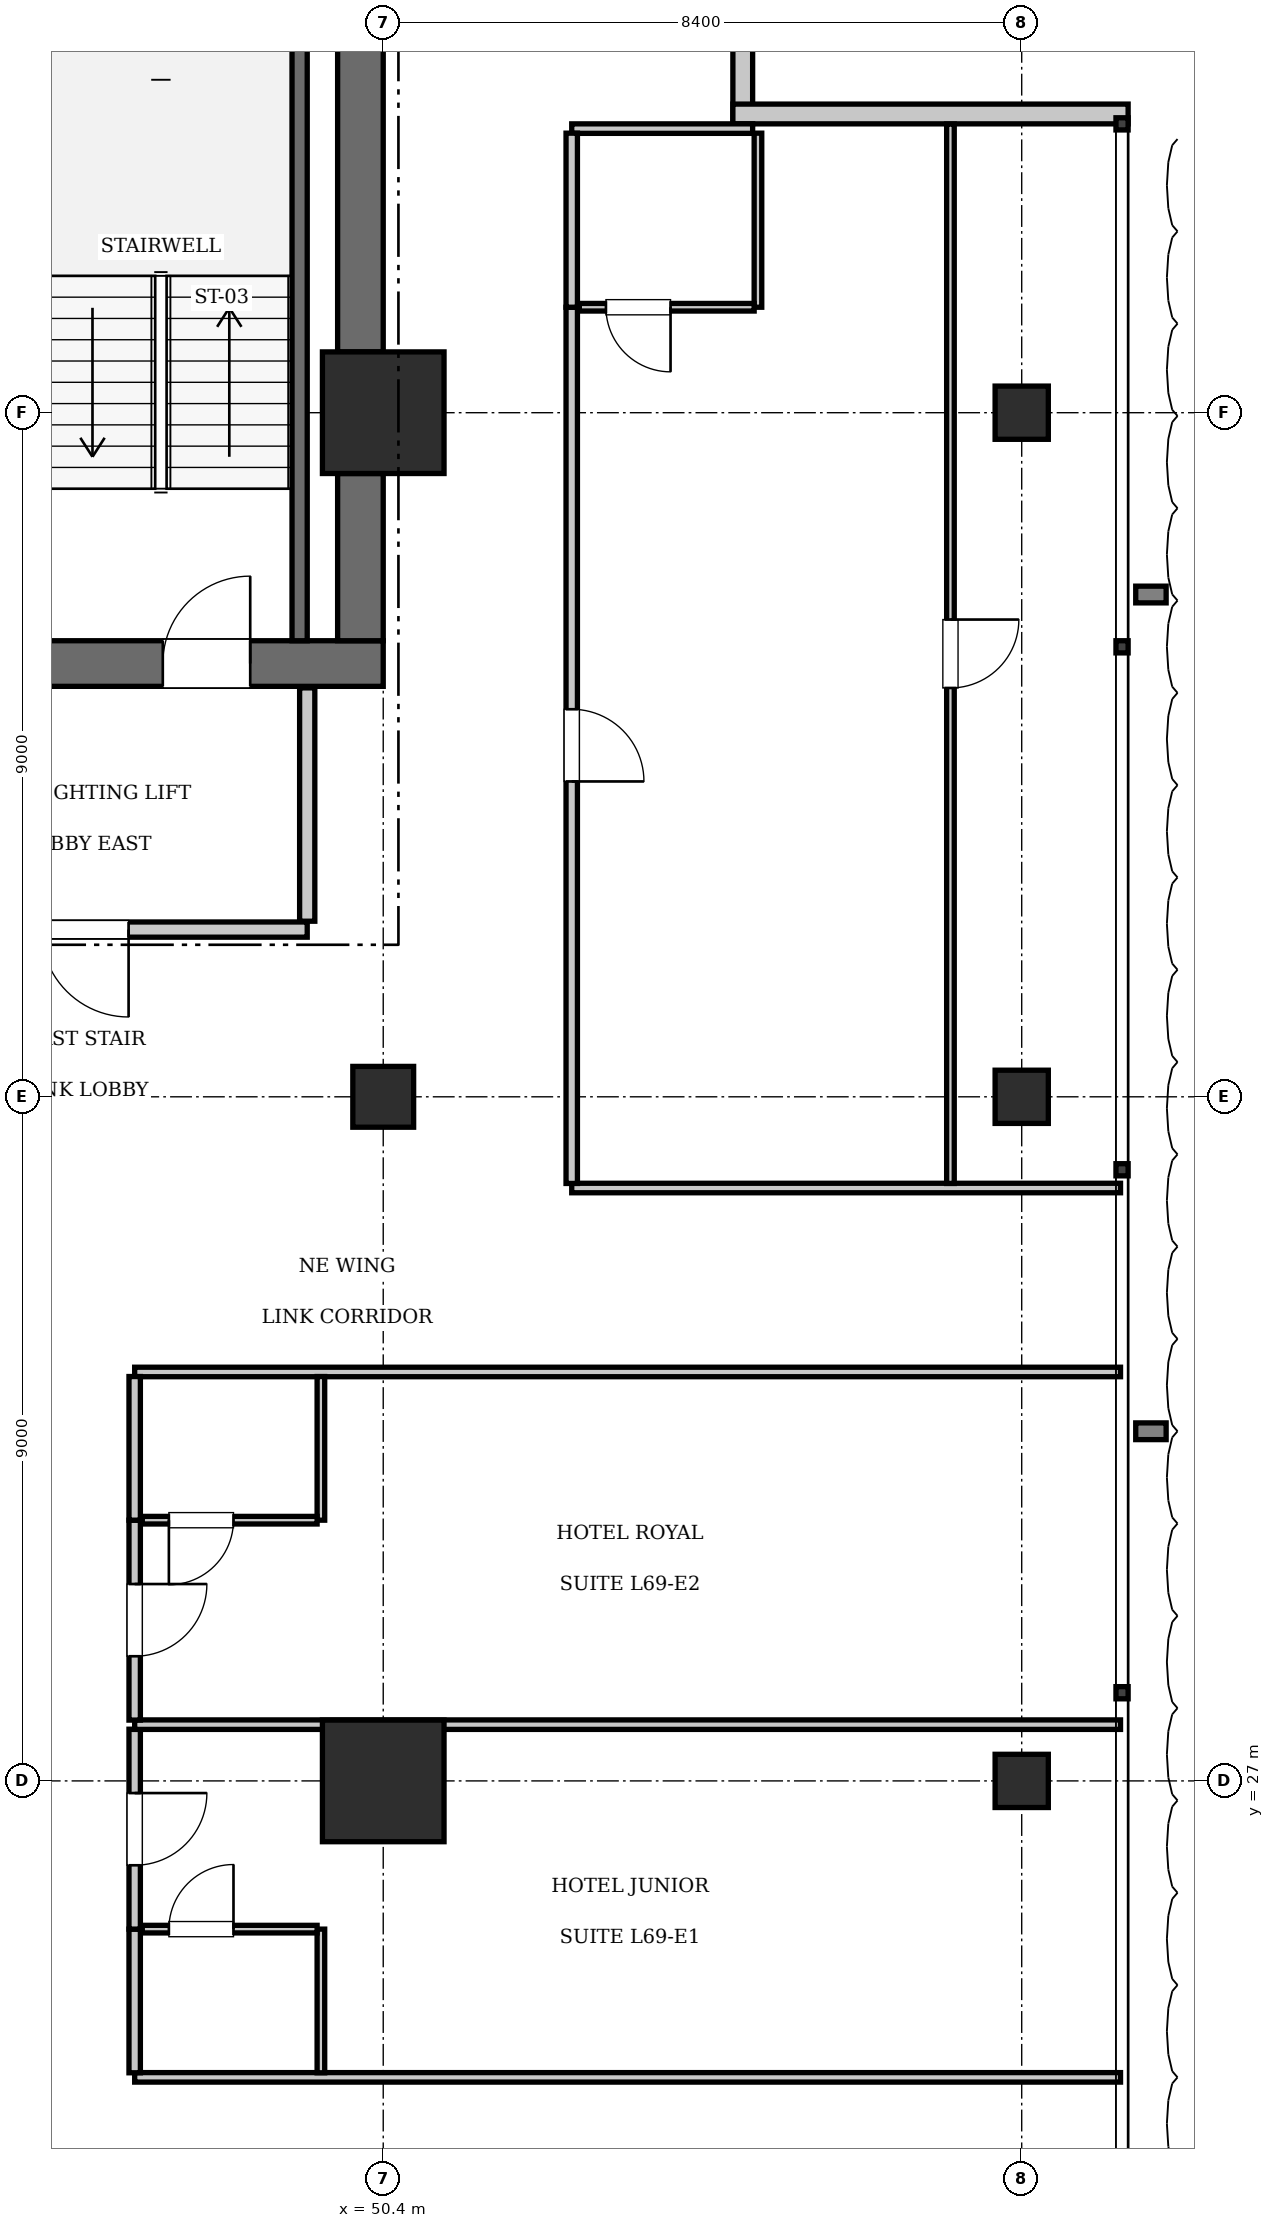
"""IFC4 building model, lengths in metres.
Left out: names, types, materials, properties, quantities, classifications, styles, units other than length and angle.
Written with IfcOpenShell. Run it as: python <this file> out.ifc"""

import sys

from ifc_helpers import new_model, si_unit, direction, frame, frame_2d, origin, origin_2d, place, context, subcontext, project, spatial, rectangle, extrude, element, fill, save


model = new_model("IFC4")
c1 = context("Model", 3, precision=1e-05, world=origin(), true_north=direction((0.0, 1.0)))
c2 = subcontext(c1, "Body", "Model", "MODEL_VIEW")
j1 = project(units=[si_unit("LENGTHUNIT", "METRE"), si_unit("PLANEANGLEUNIT", "RADIAN")], contexts=[c1])
p1 = place(None, origin())
s1 = spatial("IfcSite", under=j1, at=p1, CompositionType="ELEMENT")
p2 = place(p1, origin())
s2 = spatial("IfcBuilding", under=s1, at=p2, CompositionType="ELEMENT")
p3 = place(p2, frame((0.0, 0.0, 281.75)))
s3 = spatial("IfcBuildingStorey", under=s2, at=p3, CompositionType="ELEMENT", Elevation=281.75)
for number, where, z_axis, x_axis in (
    (1, (50.4, 27.0, 0.0), (0.0, 0.0, 1.0), (1.0, 0.0, 0.0)),
    (2, (50.4, 45.0, 0.0), (0.0, 0.0, 1.0), (1.0, 0.0, 0.0)),
):
    element("IfcColumn", number, at=place(p3, frame(where, z_axis=z_axis, x_axis=x_axis)), inside=s3, PredefinedType="COLUMN", context=c2, shape_type="SweptSolid", body=[
        extrude(rectangle(XDim=1.6, YDim=1.6, at=origin_2d()), origin(), (0.0, 0.0, 1.0), 3.85),
    ])
p4 = place(p3, frame((43.6, 41.7, 0.0), z_axis=(0.0, 0.0, 1.0), x_axis=(1.0, 0.0, 0.0)))
e3 = element("IfcWall", 3, at=p4, inside=s3, PredefinedType="SHEAR", context=c2, shape_type="SweptSolid", body=[
    extrude(rectangle(XDim=6.8, YDim=0.6, at=frame_2d((3.4, 0.0))), origin(), (0.0, 0.0, 1.0), 3.85),
])
p5 = place(p4, frame((3.9, 0.0, 0.0)))
e4 = element("IfcOpeningElement", 4, at=p5, cuts=e3, PredefinedType="OPENING", context=c2, shape_type="SweptSolid", body=[
    extrude(rectangle(XDim=1.15, YDim=2.15, at=frame_2d((0.575, 1.075))), frame((0.0, 0.31, 0.0), z_axis=(0.0, -1.0, 0.0), x_axis=(1.0, 0.0, 0.0)), (0.0, 0.0, 1.0), 0.62),
])
p6 = place(p4, frame((0.55, 0.0, 0.0)))
e5 = element("IfcOpeningElement", 5, at=p6, cuts=e3, PredefinedType="OPENING", context=c2, shape_type="SweptSolid", body=[
    extrude(rectangle(XDim=1.1, YDim=2.2, at=frame_2d((0.55, 1.1))), frame((0.0, 0.31, 0.0), z_axis=(0.0, -1.0, 0.0), x_axis=(1.0, 0.0, 0.0)), (0.0, 0.0, 1.0), 0.62),
])
p7 = place(p3, frame((50.1, 42.0, 0.0), z_axis=(0.0, 0.0, 1.0), x_axis=(0.0, 1.0, 0.0)))
e6 = element("IfcWall", 6, at=p7, inside=s3, PredefinedType="SHEAR", context=c2, shape_type="SweptSolid", body=[
    extrude(rectangle(XDim=2.2, YDim=0.6, at=frame_2d((1.1, 0.0))), origin(), (0.0, 0.0, 1.0), 3.85),
])
p8 = place(p3, frame((50.1, 45.8, 0.0), z_axis=(0.0, 0.0, 1.0), x_axis=(0.0, 1.0, 0.0)))
e7 = element("IfcWall", 7, at=p8, inside=s3, PredefinedType="SHEAR", context=c2, shape_type="SweptSolid", body=[
    extrude(rectangle(XDim=7.6, YDim=0.6, at=frame_2d((3.8, 0.0))), origin(), (0.0, 0.0, 1.0), 3.85),
])
p9 = place(p3, frame((50.4, 36.0, 0.0), z_axis=(0.0, 0.0, 1.0), x_axis=(1.0, 0.0, 0.0)))
e8 = element("IfcColumn", 8, at=p9, inside=s3, PredefinedType="COLUMN", context=c2, shape_type="SweptSolid", body=[
    extrude(rectangle(XDim=0.8, YDim=0.8, at=origin_2d()), origin(), (0.0, 0.0, 1.0), 3.85),
])
for number, where, z_axis, x_axis in (
    (9, (58.8, 27.0, 0.0), (0.0, 0.0, 1.0), (1.0, 0.0, 0.0)),
    (10, (58.8, 36.0, 0.0), (0.0, 0.0, 1.0), (1.0, 0.0, 0.0)),
    (11, (58.8, 45.0, 0.0), (0.0, 0.0, 1.0), (1.0, 0.0, 0.0)),
):
    element("IfcColumn", number, at=place(p3, frame(where, z_axis=z_axis, x_axis=x_axis)), inside=s3, PredefinedType="COLUMN", context=c2, shape_type="SweptSolid", body=[
        extrude(rectangle(XDim=0.7, YDim=0.7, at=origin_2d()), origin(), (0.0, 0.0, 1.0), 3.85),
    ])
p10 = place(p3, frame((49.3, 42.0, 0.0), z_axis=(0.0, 0.0, 1.0), x_axis=(0.0, 1.0, 0.0)))
e12 = element("IfcWall", 12, at=p10, inside=s3, PredefinedType="SOLIDWALL", context=c2, shape_type="SweptSolid", body=[
    extrude(rectangle(XDim=9.12, YDim=0.2, at=frame_2d((4.56, 0.0))), origin(), (0.0, 0.0, 1.0), 3.61),
])
for number, where, z_axis, x_axis in (
    (13, (55.13, 54.0, 0.0), (0.0, 0.0, 1.0), (0.0, -1.0, 0.0)),
    (14, (55.0, 48.93, 0.0), (0.0, 0.0, 1.0), (1.0, 0.0, 0.0)),
):
    element("IfcWall", number, at=place(p3, frame(where, z_axis=z_axis, x_axis=x_axis)), inside=s3, PredefinedType="SOLIDWALL", context=c2, shape_type="SweptSolid", body=[
        extrude(rectangle(XDim=5.2, YDim=0.26, at=frame_2d((2.6, 0.0))), origin(), (0.0, 0.0, 1.0), 3.61),
    ])
p11 = place(p3, frame((43.6, 38.2, 0.0), z_axis=(0.0, 0.0, 1.0), x_axis=(1.0, 0.0, 0.0)))
e15 = element("IfcWall", 15, at=p11, inside=s3, PredefinedType="PARTITIONING", context=c2, shape_type="SweptSolid", body=[
    extrude(rectangle(XDim=5.8, YDim=0.2, at=frame_2d((2.9, 0.0))), origin(), (0.0, 0.0, 1.0), 3.61),
])
p12 = place(p11, frame((2.3, 0.0, 0.0)))
e16 = element("IfcOpeningElement", 16, at=p12, cuts=e15, PredefinedType="OPENING", context=c2, shape_type="SweptSolid", body=[
    extrude(rectangle(XDim=1.15, YDim=2.15, at=frame_2d((0.575, 1.075))), frame((0.0, 0.11, 0.0), z_axis=(0.0, -1.0, 0.0), x_axis=(1.0, 0.0, 0.0)), (0.0, 0.0, 1.0), 0.22),
])
p13 = place(p3, frame((49.4, 38.31, 0.0), z_axis=(0.0, 0.0, 1.0), x_axis=(0.0, 1.0, 0.0)))
e17 = element("IfcWall", 17, at=p13, inside=s3, PredefinedType="PARTITIONING", context=c2, shape_type="SweptSolid", body=[
    extrude(rectangle(XDim=3.07, YDim=0.2, at=frame_2d((1.535, 0.0))), origin(), (0.0, 0.0, 1.0), 3.61),
])
for number, where, z_axis, x_axis in (
    (18, (47.13, 23.1, 0.0), (0.0, 0.0, 1.0), (1.0, 0.0, 0.0)),
    (19, (47.13, 32.38, 0.0), (0.0, 0.0, 1.0), (1.0, 0.0, 0.0)),
):
    element("IfcWall", number, at=place(p3, frame(where, z_axis=z_axis, x_axis=x_axis)), inside=s3, PredefinedType="PARTITIONING", context=c2, shape_type="SweptSolid", body=[
        extrude(rectangle(XDim=12.97, YDim=0.125, at=frame_2d((6.485, 0.0))), origin(), (0.0, 0.0, 1.0), 3.61),
    ])
p14 = place(p3, frame((47.13, 23.16, 0.0), z_axis=(0.0, 0.0, 1.0), x_axis=(0.0, 1.0, 0.0)))
e20 = element("IfcWall", 20, at=p14, inside=s3, PredefinedType="PARTITIONING", context=c2, shape_type="SweptSolid", body=[
    extrude(rectangle(XDim=1.89, YDim=0.15, at=frame_2d((0.945, 0.0))), origin(), (0.0, 0.0, 1.0), 3.61),
])
p15 = place(p3, frame((47.13, 25.05, 0.0), z_axis=(0.0, 0.0, 1.0), x_axis=(0.0, 1.0, 0.0)))
e21 = element("IfcWall", 21, at=p15, inside=s3, PredefinedType="PARTITIONING", context=c2, shape_type="SweptSolid", body=[
    extrude(rectangle(XDim=2.63, YDim=0.15, at=frame_2d((1.315, 0.0))), origin(), (0.0, 0.0, 1.0), 3.61),
])
p16 = place(p15, frame((0.84, 0.0, 0.0)))
e22 = element("IfcOpeningElement", 22, at=p16, cuts=e21, PredefinedType="OPENING", context=c2, shape_type="SweptSolid", body=[
    extrude(rectangle(XDim=0.95, YDim=2.15, at=frame_2d((0.475, 1.075))), frame((0.0, 0.085, 0.0), z_axis=(0.0, -1.0, 0.0), x_axis=(1.0, 0.0, 0.0)), (0.0, 0.0, 1.0), 0.17),
])
p17 = place(p3, frame((49.58, 23.16, 0.0), z_axis=(0.0, 0.0, 1.0), x_axis=(0.0, 1.0, 0.0)))
e23 = element("IfcWall", 23, at=p17, inside=s3, PredefinedType="PARTITIONING", context=c2, shape_type="SweptSolid", body=[
    extrude(rectangle(XDim=1.89, YDim=0.1, at=frame_2d((0.945, 0.0))), origin(), (0.0, 0.0, 1.0), 3.61),
])
p18 = place(p3, frame((47.23, 25.05, 0.0), z_axis=(0.0, 0.0, 1.0), x_axis=(1.0, 0.0, 0.0)))
e24 = element("IfcWall", 24, at=p18, inside=s3, PredefinedType="PARTITIONING", context=c2, shape_type="SweptSolid", body=[
    extrude(rectangle(XDim=2.3, YDim=0.1, at=frame_2d((1.15, 0.0))), origin(), (0.0, 0.0, 1.0), 3.61),
])
p19 = place(p18, frame((0.35, 0.0, 0.0)))
e25 = element("IfcOpeningElement", 25, at=p19, cuts=e24, PredefinedType="OPENING", context=c2, shape_type="SweptSolid", body=[
    extrude(rectangle(XDim=0.85, YDim=2.1, at=frame_2d((0.425, 1.05))), frame((0.0, 0.06, 0.0), z_axis=(0.0, -1.0, 0.0), x_axis=(1.0, 0.0, 0.0)), (0.0, 0.0, 1.0), 0.12),
])
p20 = place(p3, frame((47.13, 27.74, 0.0), z_axis=(0.0, 0.0, 1.0), x_axis=(1.0, 0.0, 0.0)))
e26 = element("IfcWall", 26, at=p20, inside=s3, PredefinedType="PARTITIONING", context=c2, shape_type="SweptSolid", body=[
    extrude(rectangle(XDim=12.97, YDim=0.125, at=frame_2d((6.485, 0.0))), origin(), (0.0, 0.0, 1.0), 3.61),
])
p21 = place(p3, frame((47.13, 27.8, 0.0), z_axis=(0.0, 0.0, 1.0), x_axis=(0.0, 1.0, 0.0)))
e27 = element("IfcWall", 27, at=p21, inside=s3, PredefinedType="PARTITIONING", context=c2, shape_type="SweptSolid", body=[
    extrude(rectangle(XDim=2.63, YDim=0.15, at=frame_2d((1.315, 0.0))), origin(), (0.0, 0.0, 1.0), 3.61),
])
p22 = place(p21, frame((0.84, 0.0, 0.0)))
e28 = element("IfcOpeningElement", 28, at=p22, cuts=e27, PredefinedType="OPENING", context=c2, shape_type="SweptSolid", body=[
    extrude(rectangle(XDim=0.95, YDim=2.15, at=frame_2d((0.475, 1.075))), frame((0.0, 0.085, 0.0), z_axis=(0.0, -1.0, 0.0), x_axis=(1.0, 0.0, 0.0)), (0.0, 0.0, 1.0), 0.17),
])
p23 = place(p3, frame((47.13, 30.43, 0.0), z_axis=(0.0, 0.0, 1.0), x_axis=(0.0, 1.0, 0.0)))
e29 = element("IfcWall", 29, at=p23, inside=s3, PredefinedType="PARTITIONING", context=c2, shape_type="SweptSolid", body=[
    extrude(rectangle(XDim=1.89, YDim=0.15, at=frame_2d((0.945, 0.0))), origin(), (0.0, 0.0, 1.0), 3.61),
])
p24 = place(p3, frame((49.58, 30.43, 0.0), z_axis=(0.0, 0.0, 1.0), x_axis=(0.0, 1.0, 0.0)))
e30 = element("IfcWall", 30, at=p24, inside=s3, PredefinedType="PARTITIONING", context=c2, shape_type="SweptSolid", body=[
    extrude(rectangle(XDim=1.89, YDim=0.1, at=frame_2d((0.945, 0.0))), origin(), (0.0, 0.0, 1.0), 3.61),
])
p25 = place(p3, frame((47.23, 30.43, 0.0), z_axis=(0.0, 0.0, 1.0), x_axis=(1.0, 0.0, 0.0)))
e31 = element("IfcWall", 31, at=p25, inside=s3, PredefinedType="PARTITIONING", context=c2, shape_type="SweptSolid", body=[
    extrude(rectangle(XDim=2.3, YDim=0.1, at=frame_2d((1.15, 0.0))), origin(), (0.0, 0.0, 1.0), 3.61),
])
p26 = place(p25, frame((0.35, 0.0, 0.0)))
e32 = element("IfcOpeningElement", 32, at=p26, cuts=e31, PredefinedType="OPENING", context=c2, shape_type="SweptSolid", body=[
    extrude(rectangle(XDim=0.85, YDim=2.1, at=frame_2d((0.425, 1.05))), frame((0.0, 0.06, 0.0), z_axis=(0.0, -1.0, 0.0), x_axis=(1.0, 0.0, 0.0)), (0.0, 0.0, 1.0), 0.12),
])
p27 = place(p3, frame((52.88, 34.8, 0.0), z_axis=(0.0, 0.0, 1.0), x_axis=(1.0, 0.0, 0.0)))
e33 = element("IfcWall", 33, at=p27, inside=s3, PredefinedType="PARTITIONING", context=c2, shape_type="SweptSolid", body=[
    extrude(rectangle(XDim=7.22, YDim=0.125, at=frame_2d((3.61, 0.0))), origin(), (0.0, 0.0, 1.0), 3.61),
])
p28 = place(p3, frame((52.88, 48.738, 0.0), z_axis=(0.0, 0.0, 1.0), x_axis=(1.0, 0.0, 0.0)))
e34 = element("IfcWall", 34, at=p28, inside=s3, PredefinedType="PARTITIONING", context=c2, shape_type="SweptSolid", body=[
    extrude(rectangle(XDim=2.38, YDim=0.125, at=frame_2d((1.19, 0.0))), origin(), (0.0, 0.0, 1.0), 3.61),
])
p29 = place(p3, frame((52.88, 34.86, 0.0), z_axis=(0.0, 0.0, 1.0), x_axis=(0.0, 1.0, 0.0)))
e35 = element("IfcWall", 35, at=p29, inside=s3, PredefinedType="PARTITIONING", context=c2, shape_type="SweptSolid", body=[
    extrude(rectangle(XDim=11.527, YDim=0.15, at=frame_2d((5.764, 0.0))), origin(), (0.0, 0.0, 1.0), 3.61),
])
p30 = place(p29, frame((5.289, 0.0, 0.0)))
e36 = element("IfcOpeningElement", 36, at=p30, cuts=e35, PredefinedType="OPENING", context=c2, shape_type="SweptSolid", body=[
    extrude(rectangle(XDim=0.95, YDim=2.15, at=frame_2d((0.475, 1.075))), frame((0.0, 0.085, 0.0), z_axis=(0.0, -1.0, 0.0), x_axis=(1.0, 0.0, 0.0)), (0.0, 0.0, 1.0), 0.17),
])
p31 = place(p3, frame((52.88, 46.387, 0.0), z_axis=(0.0, 0.0, 1.0), x_axis=(0.0, 1.0, 0.0)))
e37 = element("IfcWall", 37, at=p31, inside=s3, PredefinedType="PARTITIONING", context=c2, shape_type="SweptSolid", body=[
    extrude(rectangle(XDim=2.29, YDim=0.15, at=frame_2d((1.145, 0.0))), origin(), (0.0, 0.0, 1.0), 3.61),
])
p32 = place(p3, frame((55.33, 46.387, 0.0), z_axis=(0.0, 0.0, 1.0), x_axis=(0.0, 1.0, 0.0)))
e38 = element("IfcWall", 38, at=p32, inside=s3, PredefinedType="PARTITIONING", context=c2, shape_type="SweptSolid", body=[
    extrude(rectangle(XDim=2.29, YDim=0.1, at=frame_2d((1.145, 0.0))), origin(), (0.0, 0.0, 1.0), 3.61),
])
p33 = place(p3, frame((52.98, 46.387, 0.0), z_axis=(0.0, 0.0, 1.0), x_axis=(1.0, 0.0, 0.0)))
e39 = element("IfcWall", 39, at=p33, inside=s3, PredefinedType="PARTITIONING", context=c2, shape_type="SweptSolid", body=[
    extrude(rectangle(XDim=2.3, YDim=0.1, at=frame_2d((1.15, 0.0))), origin(), (0.0, 0.0, 1.0), 3.61),
])
p34 = place(p33, frame((0.35, 0.0, 0.0)))
e40 = element("IfcOpeningElement", 40, at=p34, cuts=e39, PredefinedType="OPENING", context=c2, shape_type="SweptSolid", body=[
    extrude(rectangle(XDim=0.85, YDim=2.1, at=frame_2d((0.425, 1.05))), frame((0.0, 0.06, 0.0), z_axis=(0.0, -1.0, 0.0), x_axis=(1.0, 0.0, 0.0)), (0.0, 0.0, 1.0), 0.12),
])
p35 = place(p3, frame((57.862, 34.86, 0.0), z_axis=(0.0, 0.0, 1.0), x_axis=(0.0, 1.0, 0.0)))
e41 = element("IfcWall", 41, at=p35, inside=s3, PredefinedType="PARTITIONING", context=c2, shape_type="SweptSolid", body=[
    extrude(rectangle(XDim=13.938, YDim=0.1, at=frame_2d((6.969, 0.0))), origin(), (0.0, 0.0, 1.0), 3.61),
])
p36 = place(p35, frame((6.519, 0.0, 0.0)))
e42 = element("IfcOpeningElement", 42, at=p36, cuts=e41, PredefinedType="OPENING", context=c2, shape_type="SweptSolid", body=[
    extrude(rectangle(XDim=0.9, YDim=2.1, at=frame_2d((0.45, 1.05))), frame((0.0, 0.06, 0.0), z_axis=(0.0, -1.0, 0.0), x_axis=(1.0, 0.0, 0.0)), (0.0, 0.0, 1.0), 0.12),
])
p37 = place(p5, origin())
e43 = element("IfcDoor", 43, at=p37, inside=s3, OperationType="SINGLE_SWING_RIGHT", PredefinedType="DOOR", context=c2, shape_type="SweptSolid", body=[
    extrude(rectangle(XDim=1.15, YDim=2.15, at=frame_2d((0.575, 1.075))), frame((0.0, 0.025, 0.0), z_axis=(0.0, -1.0, 0.0), x_axis=(1.0, 0.0, 0.0)), (0.0, 0.0, 1.0), 0.05),
])
fill(e4, e43)
p38 = place(p12, frame((1.15, 0.0, 0.0), z_axis=(0.0, 0.0, 1.0), x_axis=(-1.0, 0.0, 0.0)))
e44 = element("IfcDoor", 44, at=p38, inside=s3, OperationType="SINGLE_SWING_LEFT", PredefinedType="DOOR", context=c2, shape_type="SweptSolid", body=[
    extrude(rectangle(XDim=1.15, YDim=2.15, at=frame_2d((0.575, 1.075))), frame((0.0, 0.025, 0.0), z_axis=(0.0, -1.0, 0.0), x_axis=(1.0, 0.0, 0.0)), (0.0, 0.0, 1.0), 0.05),
])
fill(e16, e44)
p39 = place(p19, origin())
e45 = element("IfcDoor", 45, at=p39, inside=s3, OperationType="SINGLE_SWING_RIGHT", PredefinedType="DOOR", context=c2, shape_type="SweptSolid", body=[
    extrude(rectangle(XDim=0.85, YDim=2.1, at=frame_2d((0.425, 1.05))), frame((0.0, 0.025, 0.0), z_axis=(0.0, -1.0, 0.0), x_axis=(1.0, 0.0, 0.0)), (0.0, 0.0, 1.0), 0.05),
])
fill(e25, e45)
p40 = place(p16, frame((0.95, 0.0, 0.0), z_axis=(0.0, 0.0, 1.0), x_axis=(-1.0, 0.0, 0.0)))
e46 = element("IfcDoor", 46, at=p40, inside=s3, OperationType="SINGLE_SWING_LEFT", PredefinedType="DOOR", context=c2, shape_type="SweptSolid", body=[
    extrude(rectangle(XDim=0.95, YDim=2.15, at=frame_2d((0.475, 1.075))), frame((0.0, 0.025, 0.0), z_axis=(0.0, -1.0, 0.0), x_axis=(1.0, 0.0, 0.0)), (0.0, 0.0, 1.0), 0.05),
])
fill(e22, e46)
p41 = place(p26, frame((0.85, 0.0, 0.0), z_axis=(0.0, 0.0, 1.0), x_axis=(-1.0, 0.0, 0.0)))
e47 = element("IfcDoor", 47, at=p41, inside=s3, OperationType="SINGLE_SWING_RIGHT", PredefinedType="DOOR", context=c2, shape_type="SweptSolid", body=[
    extrude(rectangle(XDim=0.85, YDim=2.1, at=frame_2d((0.425, 1.05))), frame((0.0, 0.025, 0.0), z_axis=(0.0, -1.0, 0.0), x_axis=(1.0, 0.0, 0.0)), (0.0, 0.0, 1.0), 0.05),
])
fill(e32, e47)
p42 = place(p22, frame((0.95, 0.0, 0.0), z_axis=(0.0, 0.0, 1.0), x_axis=(-1.0, 0.0, 0.0)))
e48 = element("IfcDoor", 48, at=p42, inside=s3, OperationType="SINGLE_SWING_LEFT", PredefinedType="DOOR", context=c2, shape_type="SweptSolid", body=[
    extrude(rectangle(XDim=0.95, YDim=2.15, at=frame_2d((0.475, 1.075))), frame((0.0, 0.025, 0.0), z_axis=(0.0, -1.0, 0.0), x_axis=(1.0, 0.0, 0.0)), (0.0, 0.0, 1.0), 0.05),
])
fill(e28, e48)
p43 = place(p34, frame((0.85, 0.0, 0.0), z_axis=(0.0, 0.0, 1.0), x_axis=(-1.0, 0.0, 0.0)))
e49 = element("IfcDoor", 49, at=p43, inside=s3, OperationType="SINGLE_SWING_LEFT", PredefinedType="DOOR", context=c2, shape_type="SweptSolid", body=[
    extrude(rectangle(XDim=0.85, YDim=2.1, at=frame_2d((0.425, 1.05))), frame((0.0, 0.025, 0.0), z_axis=(0.0, -1.0, 0.0), x_axis=(1.0, 0.0, 0.0)), (0.0, 0.0, 1.0), 0.05),
])
fill(e40, e49)
p44 = place(p30, frame((0.95, 0.0, 0.0), z_axis=(0.0, 0.0, 1.0), x_axis=(-1.0, 0.0, 0.0)))
e50 = element("IfcDoor", 50, at=p44, inside=s3, OperationType="SINGLE_SWING_RIGHT", PredefinedType="DOOR", context=c2, shape_type="SweptSolid", body=[
    extrude(rectangle(XDim=0.95, YDim=2.15, at=frame_2d((0.475, 1.075))), frame((0.0, 0.025, 0.0), z_axis=(0.0, -1.0, 0.0), x_axis=(1.0, 0.0, 0.0)), (0.0, 0.0, 1.0), 0.05),
])
fill(e36, e50)
p45 = place(p36, frame((0.9, 0.0, 0.0), z_axis=(0.0, 0.0, 1.0), x_axis=(-1.0, 0.0, 0.0)))
e51 = element("IfcDoor", 51, at=p45, inside=s3, OperationType="SINGLE_SWING_LEFT", PredefinedType="DOOR", context=c2, shape_type="SweptSolid", body=[
    extrude(rectangle(XDim=0.9, YDim=2.1, at=frame_2d((0.45, 1.05))), frame((0.0, 0.025, 0.0), z_axis=(0.0, -1.0, 0.0), x_axis=(1.0, 0.0, 0.0)), (0.0, 0.0, 1.0), 0.05),
])
fill(e42, e51)
save(model, sys.argv[1])
